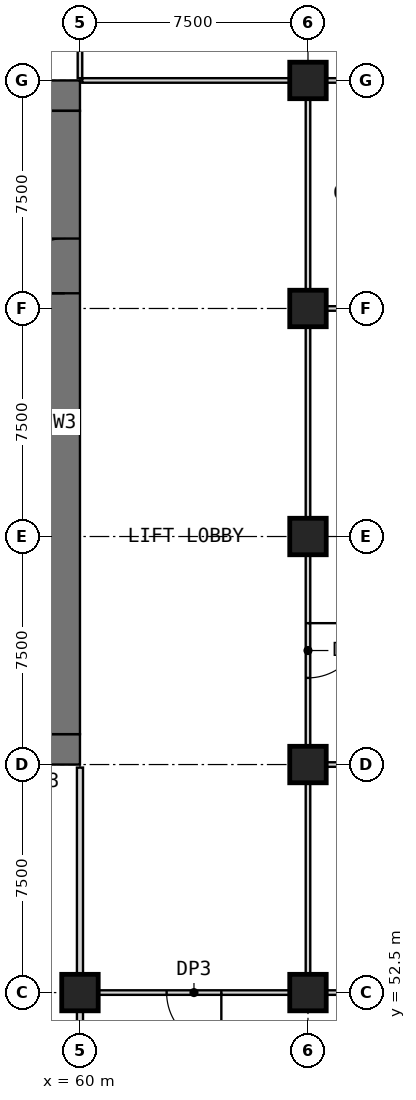
"""IFC4 building model, lengths in metres.
Left out: names, types, materials, properties, quantities, classifications, styles, units other than length and angle.
Written with IfcOpenShell. Run it as: python <this file> out.ifc"""

import sys

from ifc_helpers import new_model, si_unit, direction, frame, frame_2d, origin, origin_2d, place, context, subcontext, project, spatial, rectangle, extrude, element, fill, save


model = new_model("IFC4")
c1 = context("Model", 3, precision=1e-05, world=origin(), true_north=direction((0.0, 1.0)))
c2 = subcontext(c1, "Body", "Model", "MODEL_VIEW")
j1 = project(units=[si_unit("LENGTHUNIT", "METRE"), si_unit("PLANEANGLEUNIT", "RADIAN")], contexts=[c1])
p1 = place(None, origin())
s1 = spatial("IfcSite", under=j1, at=p1, CompositionType="ELEMENT")
p2 = place(p1, origin())
s2 = spatial("IfcBuilding", under=s1, at=p2, CompositionType="ELEMENT")
p3 = place(p2, origin())
s3 = spatial("IfcBuildingStorey", under=s2, at=p3, CompositionType="ELEMENT", Elevation=0.0)
for number, where, z_axis, x_axis in (
    (1, (60.0, 52.5, 0.0), (0.0, 0.0, 1.0), (1.0, 0.0, 0.0)),
    (2, (67.5, 52.5, 0.0), (0.0, 0.0, 1.0), (1.0, 0.0, 0.0)),
    (3, (67.5, 60.0, 0.0), (0.0, 0.0, 1.0), (1.0, 0.0, 0.0)),
    (4, (67.5, 67.5, 0.0), (0.0, 0.0, 1.0), (1.0, 0.0, 0.0)),
    (5, (67.5, 75.0, 0.0), (0.0, 0.0, 1.0), (1.0, 0.0, 0.0)),
    (6, (67.5, 82.5, 0.0), (0.0, 0.0, 1.0), (1.0, 0.0, 0.0)),
):
    element("IfcColumn", number, at=place(p3, frame(where, z_axis=z_axis, x_axis=x_axis)), inside=s3, PredefinedType="COLUMN", context=c2, shape_type="SweptSolid", body=[
        extrude(rectangle(XDim=1.2, YDim=1.2, at=origin_2d()), origin(), (0.0, 0.0, 1.0), 8.0),
    ])
p4 = place(p3, frame((30.0, 60.5, 0.0), z_axis=(0.0, 0.0, 1.0), x_axis=(1.0, 0.0, 0.0)))
e7 = element("IfcWall", 7, at=p4, inside=s3, PredefinedType="SHEAR", context=c2, shape_type="SweptSolid", body=[
    extrude(rectangle(XDim=30.0, YDim=1.0, at=frame_2d((15.0, 0.0))), origin(), (0.0, 0.0, 1.0), 8.0),
])
p5 = place(p4, frame((21.9, 0.0, 0.0)))
e8 = element("IfcOpeningElement", 8, at=p5, cuts=e7, PredefinedType="OPENING", context=c2, shape_type="SweptSolid", body=[
    extrude(rectangle(XDim=1.8, YDim=2.1, at=frame_2d((0.9, 1.05))), frame((0.0, 0.51, 0.0), z_axis=(0.0, -1.0, 0.0), x_axis=(1.0, 0.0, 0.0)), (0.0, 0.0, 1.0), 1.02),
])
p6 = place(p4, frame((26.5, 0.0, 0.0)))
e9 = element("IfcOpeningElement", 9, at=p6, cuts=e7, PredefinedType="OPENING", context=c2, shape_type="SweptSolid", body=[
    extrude(rectangle(XDim=1.2, YDim=2.1, at=frame_2d((0.6, 1.05))), frame((0.0, 0.51, 0.0), z_axis=(0.0, -1.0, 0.0), x_axis=(1.0, 0.0, 0.0)), (0.0, 0.0, 1.0), 1.02),
])
p7 = place(p3, frame((30.0, 82.0, 0.0), z_axis=(0.0, 0.0, 1.0), x_axis=(1.0, 0.0, 0.0)))
e10 = element("IfcWall", 10, at=p7, inside=s3, PredefinedType="SHEAR", context=c2, shape_type="SweptSolid", body=[
    extrude(rectangle(XDim=30.0, YDim=1.0, at=frame_2d((15.0, 0.0))), origin(), (0.0, 0.0, 1.0), 8.0),
])
p8 = place(p3, frame((59.5, 61.0, 0.0), z_axis=(0.0, 0.0, 1.0), x_axis=(0.0, 1.0, 0.0)))
e11 = element("IfcWall", 11, at=p8, inside=s3, PredefinedType="SHEAR", context=c2, shape_type="SweptSolid", body=[
    extrude(rectangle(XDim=20.5, YDim=1.0, at=frame_2d((10.25, 0.0))), origin(), (0.0, 0.0, 1.0), 8.0),
])
p9 = place(p8, frame((14.5, 0.0, 0.0)))
e12 = element("IfcOpeningElement", 12, at=p9, cuts=e11, PredefinedType="OPENING", context=c2, shape_type="SweptSolid", body=[
    extrude(rectangle(XDim=1.8, YDim=2.1, at=frame_2d((0.9, 1.05))), frame((0.0, 0.51, 0.0), z_axis=(0.0, -1.0, 0.0), x_axis=(1.0, 0.0, 0.0)), (0.0, 0.0, 1.0), 1.02),
])
p10 = place(p3, frame((66.9, 52.5, 0.0), z_axis=(0.0, 0.0, 1.0), x_axis=(-1.0, 0.0, 0.0)))
e13 = element("IfcWall", 13, at=p10, inside=s3, PredefinedType="PARTITIONING", context=c2, shape_type="SweptSolid", body=[
    extrude(rectangle(XDim=6.3, YDim=0.15, at=frame_2d((3.15, 0.0))), origin(), (0.0, 0.0, 1.0), 7.7),
])
p11 = place(p10, frame((2.25, 0.0, 0.0)))
e14 = element("IfcOpeningElement", 14, at=p11, cuts=e13, PredefinedType="OPENING", context=c2, shape_type="SweptSolid", body=[
    extrude(rectangle(XDim=1.8, YDim=2.4, at=frame_2d((0.9, 1.2))), frame((0.0, 0.085, 0.0), z_axis=(0.0, -1.0, 0.0), x_axis=(1.0, 0.0, 0.0)), (0.0, 0.0, 1.0), 0.17),
])
for number, where, z_axis, x_axis in (
    (15, (68.1, 52.5, 0.0), (0.0, 0.0, 1.0), (1.0, 0.0, 0.0)),
    (16, (68.1, 60.0, 0.0), (0.0, 0.0, 1.0), (1.0, 0.0, 0.0)),
):
    element("IfcWall", number, at=place(p3, frame(where, z_axis=z_axis, x_axis=x_axis)), inside=s3, PredefinedType="PARTITIONING", context=c2, shape_type="SweptSolid", body=[
        extrude(rectangle(XDim=5.8, YDim=0.15, at=frame_2d((2.9, 0.0))), origin(), (0.0, 0.0, 1.0), 7.7),
    ])
p12 = place(p3, frame((60.075, 82.5, 0.0), z_axis=(0.0, 0.0, 1.0), x_axis=(1.0, 0.0, 0.0)))
e17 = element("IfcWall", 17, at=p12, inside=s3, PredefinedType="PARTITIONING", context=c2, shape_type="SweptSolid", body=[
    extrude(rectangle(XDim=6.825, YDim=0.15, at=frame_2d((3.413, 0.0))), origin(), (0.0, 0.0, 1.0), 7.7),
])
p13 = place(p3, frame((68.1, 82.5, 0.0), z_axis=(0.0, 0.0, 1.0), x_axis=(1.0, 0.0, 0.0)))
e18 = element("IfcWall", 18, at=p13, inside=s3, PredefinedType="PARTITIONING", context=c2, shape_type="SweptSolid", body=[
    extrude(rectangle(XDim=5.8, YDim=0.15, at=frame_2d((2.9, 0.0))), origin(), (0.0, 0.0, 1.0), 7.7),
])
p14 = place(p3, frame((73.9, 75.0, 0.0), z_axis=(0.0, 0.0, 1.0), x_axis=(-1.0, 0.0, 0.0)))
e19 = element("IfcWall", 19, at=p14, inside=s3, PredefinedType="PARTITIONING", context=c2, shape_type="SweptSolid", body=[
    extrude(rectangle(XDim=5.8, YDim=0.15, at=frame_2d((2.9, 0.0))), origin(), (0.0, 0.0, 1.0), 7.7),
])
p15 = place(p14, frame((2.3, 0.0, 0.0)))
e20 = element("IfcOpeningElement", 20, at=p15, cuts=e19, PredefinedType="OPENING", context=c2, shape_type="SweptSolid", body=[
    extrude(rectangle(XDim=1.0, YDim=2.1, at=frame_2d((0.5, 1.05))), frame((0.0, 0.085, 0.0), z_axis=(0.0, -1.0, 0.0), x_axis=(1.0, 0.0, 0.0)), (0.0, 0.0, 1.0), 0.17),
])
p16 = place(p3, frame((60.0, 46.1, 0.0), z_axis=(0.0, 0.0, 1.0), x_axis=(0.0, 1.0, 0.0)))
e21 = element("IfcWall", 21, at=p16, inside=s3, PredefinedType="PARTITIONING", context=c2, shape_type="SweptSolid", body=[
    extrude(rectangle(XDim=5.8, YDim=0.2, at=frame_2d((2.9, 0.0))), origin(), (0.0, 0.0, 1.0), 7.7),
])
p17 = place(p3, frame((60.0, 53.1, 0.0), z_axis=(0.0, 0.0, 1.0), x_axis=(0.0, 1.0, 0.0)))
e22 = element("IfcWall", 22, at=p17, inside=s3, PredefinedType="PARTITIONING", context=c2, shape_type="SweptSolid", body=[
    extrude(rectangle(XDim=6.8, YDim=0.2, at=frame_2d((3.4, 0.0))), origin(), (0.0, 0.0, 1.0), 7.7),
])
p18 = place(p3, frame((60.0, 82.575, 0.0), z_axis=(0.0, 0.0, 1.0), x_axis=(0.0, 1.0, 0.0)))
e23 = element("IfcWall", 23, at=p18, inside=s3, PredefinedType="PARTITIONING", context=c2, shape_type="SweptSolid", body=[
    extrude(rectangle(XDim=6.825, YDim=0.15, at=frame_2d((3.413, 0.0))), origin(), (0.0, 0.0, 1.0), 7.7),
])
p19 = place(p3, frame((67.5, 53.1, 0.0), z_axis=(0.0, 0.0, 1.0), x_axis=(0.0, 1.0, 0.0)))
e24 = element("IfcWall", 24, at=p19, inside=s3, PredefinedType="PARTITIONING", context=c2, shape_type="SweptSolid", body=[
    extrude(rectangle(XDim=6.3, YDim=0.15, at=frame_2d((3.15, 0.0))), origin(), (0.0, 0.0, 1.0), 7.7),
])
p20 = place(p3, frame((67.5, 66.9, 0.0), z_axis=(0.0, 0.0, 1.0), x_axis=(0.0, -1.0, 0.0)))
e25 = element("IfcWall", 25, at=p20, inside=s3, PredefinedType="PARTITIONING", context=c2, shape_type="SweptSolid", body=[
    extrude(rectangle(XDim=6.3, YDim=0.15, at=frame_2d((3.15, 0.0))), origin(), (0.0, 0.0, 1.0), 7.7),
])
p21 = place(p20, frame((2.25, 0.0, 0.0)))
e26 = element("IfcOpeningElement", 26, at=p21, cuts=e25, PredefinedType="OPENING", context=c2, shape_type="SweptSolid", body=[
    extrude(rectangle(XDim=1.8, YDim=2.4, at=frame_2d((0.9, 1.2))), frame((0.0, 0.085, 0.0), z_axis=(0.0, -1.0, 0.0), x_axis=(1.0, 0.0, 0.0)), (0.0, 0.0, 1.0), 0.17),
])
for number, where, z_axis, x_axis in (
    (27, (67.5, 68.1, 0.0), (0.0, 0.0, 1.0), (0.0, 1.0, 0.0)),
    (28, (67.5, 75.6, 0.0), (0.0, 0.0, 1.0), (0.0, 1.0, 0.0)),
):
    element("IfcWall", number, at=place(p3, frame(where, z_axis=z_axis, x_axis=x_axis)), inside=s3, PredefinedType="PARTITIONING", context=c2, shape_type="SweptSolid", body=[
        extrude(rectangle(XDim=6.3, YDim=0.15, at=frame_2d((3.15, 0.0))), origin(), (0.0, 0.0, 1.0), 7.7),
    ])
p22 = place(p9, origin())
e29 = element("IfcDoor", 29, at=p22, inside=s3, OperationType="DOUBLE_DOOR_SINGLE_SWING", PredefinedType="DOOR", context=c2, shape_type="SweptSolid", body=[
    extrude(rectangle(XDim=1.8, YDim=2.1, at=frame_2d((0.9, 1.05))), frame((0.0, 0.025, 0.0), z_axis=(0.0, -1.0, 0.0), x_axis=(1.0, 0.0, 0.0)), (0.0, 0.0, 1.0), 0.05),
])
fill(e12, e29)
p23 = place(p11, origin())
e30 = element("IfcDoor", 30, at=p23, inside=s3, OperationType="SINGLE_SWING_LEFT", PredefinedType="DOOR", context=c2, shape_type="SweptSolid", body=[
    extrude(rectangle(XDim=1.8, YDim=2.4, at=frame_2d((0.9, 1.2))), frame((0.0, 0.025, 0.0), z_axis=(0.0, -1.0, 0.0), x_axis=(1.0, 0.0, 0.0)), (0.0, 0.0, 1.0), 0.05),
])
fill(e14, e30)
p24 = place(p21, origin())
e31 = element("IfcDoor", 31, at=p24, inside=s3, OperationType="SINGLE_SWING_LEFT", PredefinedType="DOOR", context=c2, shape_type="SweptSolid", body=[
    extrude(rectangle(XDim=1.8, YDim=2.4, at=frame_2d((0.9, 1.2))), frame((0.0, 0.025, 0.0), z_axis=(0.0, -1.0, 0.0), x_axis=(1.0, 0.0, 0.0)), (0.0, 0.0, 1.0), 0.05),
])
fill(e26, e31)
save(model, sys.argv[1])
